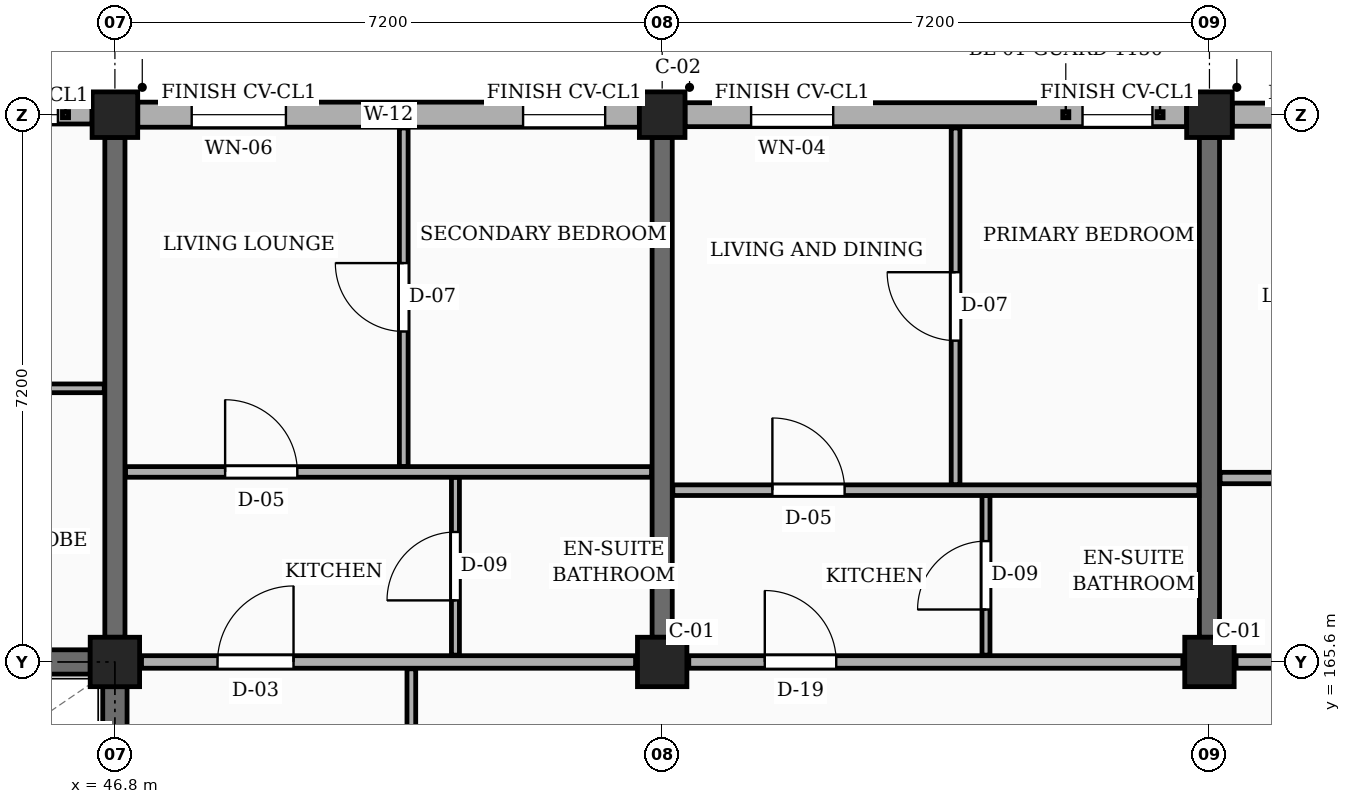
"""IFC4 building model, lengths in metres.
Left out: names, types, materials, properties, quantities, classifications, styles, units other than length and angle.
Written with IfcOpenShell. Run it as: python <this file> out.ifc"""

import sys

from ifc_helpers import new_model, si_unit, direction, frame, frame_2d, origin, origin_2d, place, context, subcontext, project, spatial, rectangle, extrude, element, fill, save


model = new_model("IFC4")
c1 = context("Model", 3, precision=1e-05, world=origin(), true_north=direction((0.0, 1.0)))
c2 = subcontext(c1, "Body", "Model", "MODEL_VIEW")
j1 = project(units=[si_unit("LENGTHUNIT", "METRE"), si_unit("PLANEANGLEUNIT", "RADIAN")], contexts=[c1])
p1 = place(None, origin())
s1 = spatial("IfcSite", under=j1, at=p1, CompositionType="ELEMENT")
p2 = place(p1, origin())
s2 = spatial("IfcBuilding", under=s1, at=p2, CompositionType="ELEMENT")
p3 = place(p2, frame((0.0, 0.0, 7.65)))
s3 = spatial("IfcBuildingStorey", under=s2, at=p3, CompositionType="ELEMENT", Elevation=7.65)
p4 = place(p3, frame((46.8, 165.6, 0.0), z_axis=(0.0, 0.0, 1.0), x_axis=(1.0, 0.0, 0.0)))
e1 = element("IfcColumn", 1, at=p4, inside=s3, PredefinedType="COLUMN", context=c2, shape_type="SweptSolid", body=[
    extrude(rectangle(XDim=0.65, YDim=0.65, at=origin_2d()), origin(), (0.0, 0.0, 1.0), 3.15),
])
p5 = place(p3, frame((46.8, 172.8, 0.0), z_axis=(0.0, 0.0, 1.0), x_axis=(1.0, 0.0, 0.0)))
e2 = element("IfcColumn", 2, at=p5, inside=s3, PredefinedType="COLUMN", context=c2, shape_type="SweptSolid", body=[
    extrude(rectangle(XDim=0.6, YDim=0.6, at=origin_2d()), origin(), (0.0, 0.0, 1.0), 3.15),
])
p6 = place(p3, frame((54.0, 165.6, 0.0), z_axis=(0.0, 0.0, 1.0), x_axis=(1.0, 0.0, 0.0)))
e3 = element("IfcColumn", 3, at=p6, inside=s3, PredefinedType="COLUMN", context=c2, shape_type="SweptSolid", body=[
    extrude(rectangle(XDim=0.65, YDim=0.65, at=origin_2d()), origin(), (0.0, 0.0, 1.0), 3.15),
])
p7 = place(p3, frame((54.0, 172.8, 0.0), z_axis=(0.0, 0.0, 1.0), x_axis=(1.0, 0.0, 0.0)))
e4 = element("IfcColumn", 4, at=p7, inside=s3, PredefinedType="COLUMN", context=c2, shape_type="SweptSolid", body=[
    extrude(rectangle(XDim=0.6, YDim=0.6, at=origin_2d()), origin(), (0.0, 0.0, 1.0), 3.15),
])
p8 = place(p3, frame((61.2, 165.6, 0.0), z_axis=(0.0, 0.0, 1.0), x_axis=(1.0, 0.0, 0.0)))
e5 = element("IfcColumn", 5, at=p8, inside=s3, PredefinedType="COLUMN", context=c2, shape_type="SweptSolid", body=[
    extrude(rectangle(XDim=0.65, YDim=0.65, at=origin_2d()), origin(), (0.0, 0.0, 1.0), 3.15),
])
p9 = place(p3, frame((61.2, 172.8, 0.0), z_axis=(0.0, 0.0, 1.0), x_axis=(1.0, 0.0, 0.0)))
e6 = element("IfcColumn", 6, at=p9, inside=s3, PredefinedType="COLUMN", context=c2, shape_type="SweptSolid", body=[
    extrude(rectangle(XDim=0.6, YDim=0.6, at=origin_2d()), origin(), (0.0, 0.0, 1.0), 3.15),
])
for number, where, z_axis, x_axis in (
    (7, (46.8, 165.925, 0.0), (0.0, 0.0, 1.0), (0.0, 1.0, 0.0)),
    (8, (54.0, 165.925, 0.0), (0.0, 0.0, 1.0), (0.0, 1.0, 0.0)),
    (9, (61.2, 165.925, 0.0), (0.0, 0.0, 1.0), (0.0, 1.0, 0.0)),
):
    element("IfcWall", number, at=place(p3, frame(where, z_axis=z_axis, x_axis=x_axis)), inside=s3, PredefinedType="SOLIDWALL", context=c2, shape_type="SweptSolid", body=[
        extrude(rectangle(XDim=6.575, YDim=0.265, at=frame_2d((3.288, 0.0))), origin(), (0.0, 0.0, 1.0), 2.185),
    ])
p10 = place(p3, frame((68.1, 172.8, 0.0), z_axis=(0.0, 0.0, 1.0), x_axis=(-1.0, 0.0, 0.0)))
e10 = element("IfcWall", 10, at=p10, inside=s3, PredefinedType="SOLIDWALL", context=c2, shape_type="SweptSolid", body=[
    extrude(rectangle(XDim=6.6, YDim=0.305, at=frame_2d((3.3, 0.0))), origin(), (0.0, 0.0, 1.0), 2.455),
])
p11 = place(p10, frame((0.45, 0.0, 0.78)))
e11 = element("IfcOpeningElement", 11, at=p11, cuts=e10, PredefinedType="OPENING", context=c2, shape_type="SweptSolid", body=[
    extrude(rectangle(XDim=1.45, YDim=1.44, at=frame_2d((0.725, 0.72))), frame((0.0, 0.163, 0.0), z_axis=(0.0, -1.0, 0.0), x_axis=(1.0, 0.0, 0.0)), (0.0, 0.0, 1.0), 0.325),
])
p12 = place(p10, frame((4.65, 0.0, 0.78)))
e12 = element("IfcOpeningElement", 12, at=p12, cuts=e10, PredefinedType="OPENING", context=c2, shape_type="SweptSolid", body=[
    extrude(rectangle(XDim=0.92, YDim=1.15, at=frame_2d((0.46, 0.575))), frame((0.0, 0.163, 0.0), z_axis=(0.0, -1.0, 0.0), x_axis=(1.0, 0.0, 0.0)), (0.0, 0.0, 1.0), 0.325),
])
p13 = place(p3, frame((60.9, 172.8, 0.0), z_axis=(0.0, 0.0, 1.0), x_axis=(-1.0, 0.0, 0.0)))
e13 = element("IfcWall", 13, at=p13, inside=s3, PredefinedType="SOLIDWALL", context=c2, shape_type="SweptSolid", body=[
    extrude(rectangle(XDim=6.6, YDim=0.315, at=frame_2d((3.3, 0.0))), origin(), (0.0, 0.0, 1.0), 2.455),
])
p14 = place(p13, frame((0.45, 0.0, 0.78)))
e14 = element("IfcOpeningElement", 14, at=p14, cuts=e13, PredefinedType="OPENING", context=c2, shape_type="SweptSolid", body=[
    extrude(rectangle(XDim=0.92, YDim=1.15, at=frame_2d((0.46, 0.575))), frame((0.0, 0.167, 0.0), z_axis=(0.0, -1.0, 0.0), x_axis=(1.0, 0.0, 0.0)), (0.0, 0.0, 1.0), 0.335),
])
p15 = place(p13, frame((4.65, 0.0, 0.78)))
e15 = element("IfcOpeningElement", 15, at=p15, cuts=e13, PredefinedType="OPENING", context=c2, shape_type="SweptSolid", body=[
    extrude(rectangle(XDim=1.08, YDim=1.15, at=frame_2d((0.54, 0.575))), frame((0.0, 0.167, 0.0), z_axis=(0.0, -1.0, 0.0), x_axis=(1.0, 0.0, 0.0)), (0.0, 0.0, 1.0), 0.335),
])
p16 = place(p3, frame((53.7, 172.8, 0.0), z_axis=(0.0, 0.0, 1.0), x_axis=(-1.0, 0.0, 0.0)))
e16 = element("IfcWall", 16, at=p16, inside=s3, PredefinedType="SOLIDWALL", context=c2, shape_type="SweptSolid", body=[
    extrude(rectangle(XDim=6.6, YDim=0.33, at=frame_2d((3.3, 0.0))), origin(), (0.0, 0.0, 1.0), 2.455),
])
p17 = place(p16, frame((0.45, 0.0, 0.78)))
e17 = element("IfcOpeningElement", 17, at=p17, cuts=e16, PredefinedType="OPENING", context=c2, shape_type="SweptSolid", body=[
    extrude(rectangle(XDim=1.08, YDim=1.15, at=frame_2d((0.54, 0.575))), frame((0.0, 0.175, 0.0), z_axis=(0.0, -1.0, 0.0), x_axis=(1.0, 0.0, 0.0)), (0.0, 0.0, 1.0), 0.35),
])
p18 = place(p16, frame((4.65, 0.0, 0.78)))
e18 = element("IfcOpeningElement", 18, at=p18, cuts=e16, PredefinedType="OPENING", context=c2, shape_type="SweptSolid", body=[
    extrude(rectangle(XDim=1.24, YDim=1.15, at=frame_2d((0.62, 0.575))), frame((0.0, 0.175, 0.0), z_axis=(0.0, -1.0, 0.0), x_axis=(1.0, 0.0, 0.0)), (0.0, 0.0, 1.0), 0.35),
])
p19 = place(p3, frame((46.5, 172.8, 0.0), z_axis=(0.0, 0.0, 1.0), x_axis=(-1.0, 0.0, 0.0)))
e19 = element("IfcWall", 19, at=p19, inside=s3, PredefinedType="SOLIDWALL", context=c2, shape_type="SweptSolid", body=[
    extrude(rectangle(XDim=6.6, YDim=0.245, at=frame_2d((3.3, 0.0))), origin(), (0.0, 0.0, 1.0), 2.455),
])
p20 = place(p19, frame((0.45, 0.0, 0.78)))
e20 = element("IfcOpeningElement", 20, at=p20, cuts=e19, PredefinedType="OPENING", context=c2, shape_type="SweptSolid", body=[
    extrude(rectangle(XDim=1.24, YDim=1.15, at=frame_2d((0.62, 0.575))), frame((0.0, 0.133, 0.0), z_axis=(0.0, -1.0, 0.0), x_axis=(1.0, 0.0, 0.0)), (0.0, 0.0, 1.0), 0.265),
])
p21 = place(p19, frame((4.65, 0.0, 0.78)))
e21 = element("IfcOpeningElement", 21, at=p21, cuts=e19, PredefinedType="OPENING", context=c2, shape_type="SweptSolid", body=[
    extrude(rectangle(XDim=1.4, YDim=1.15, at=frame_2d((0.7, 0.575))), frame((0.0, 0.133, 0.0), z_axis=(0.0, -1.0, 0.0), x_axis=(1.0, 0.0, 0.0)), (0.0, 0.0, 1.0), 0.265),
])
p22 = place(p3, frame((39.925, 165.6, 0.0), z_axis=(0.0, 0.0, 1.0), x_axis=(1.0, 0.0, 0.0)))
e22 = element("IfcWall", 22, at=p22, inside=s3, PredefinedType="SHEAR", context=c2, shape_type="SweptSolid", body=[
    extrude(rectangle(XDim=6.55, YDim=0.32, at=frame_2d((3.275, 0.0))), origin(), (0.0, 0.0, 1.0), 2.885),
])
p23 = place(p3, frame((46.8, 158.725, 0.0), z_axis=(0.0, 0.0, 1.0), x_axis=(0.0, 1.0, 0.0)))
e23 = element("IfcWall", 23, at=p23, inside=s3, PredefinedType="SHEAR", context=c2, shape_type="SweptSolid", body=[
    extrude(rectangle(XDim=6.55, YDim=0.32, at=frame_2d((3.275, 0.0))), origin(), (0.0, 0.0, 1.0), 2.885),
])
p24 = place(p3, frame((47.15, 165.6, 0.0), z_axis=(0.0, 0.0, 1.0), x_axis=(1.0, 0.0, 0.0)))
e24 = element("IfcWall", 24, at=p24, inside=s3, PredefinedType="PARTITIONING", context=c2, shape_type="SweptSolid", body=[
    extrude(rectangle(XDim=6.5, YDim=0.165, at=frame_2d((3.25, 0.0))), origin(), (0.0, 0.0, 1.0), 2.185),
])
p25 = place(p24, frame((1.0, 0.0, 0.0)))
e25 = element("IfcOpeningElement", 25, at=p25, cuts=e24, PredefinedType="OPENING", context=c2, shape_type="SweptSolid", body=[
    extrude(rectangle(XDim=1.0, YDim=2.15, at=frame_2d((0.5, 1.075))), frame((0.0, 0.093, 0.0), z_axis=(0.0, -1.0, 0.0), x_axis=(1.0, 0.0, 0.0)), (0.0, 0.0, 1.0), 0.185),
])
p26 = place(p3, frame((54.35, 165.6, 0.0), z_axis=(0.0, 0.0, 1.0), x_axis=(1.0, 0.0, 0.0)))
e26 = element("IfcWall", 26, at=p26, inside=s3, PredefinedType="PARTITIONING", context=c2, shape_type="SweptSolid", body=[
    extrude(rectangle(XDim=6.5, YDim=0.165, at=frame_2d((3.25, 0.0))), origin(), (0.0, 0.0, 1.0), 2.185),
])
p27 = place(p26, frame((1.0, 0.0, 0.0)))
e27 = element("IfcOpeningElement", 27, at=p27, cuts=e26, PredefinedType="OPENING", context=c2, shape_type="SweptSolid", body=[
    extrude(rectangle(XDim=0.94, YDim=2.12, at=frame_2d((0.47, 1.06))), frame((0.0, 0.093, 0.0), z_axis=(0.0, -1.0, 0.0), x_axis=(1.0, 0.0, 0.0)), (0.0, 0.0, 1.0), 0.185),
])
p28 = place(p3, frame((61.55, 165.6, 0.0), z_axis=(0.0, 0.0, 1.0), x_axis=(1.0, 0.0, 0.0)))
e28 = element("IfcWall", 28, at=p28, inside=s3, PredefinedType="PARTITIONING", context=c2, shape_type="SweptSolid", body=[
    extrude(rectangle(XDim=6.5, YDim=0.165, at=frame_2d((3.25, 0.0))), origin(), (0.0, 0.0, 1.0), 2.185),
])
p29 = place(p28, frame((1.0, 0.0, 0.0)))
e29 = element("IfcOpeningElement", 29, at=p29, cuts=e28, PredefinedType="OPENING", context=c2, shape_type="SweptSolid", body=[
    extrude(rectangle(XDim=1.14, YDim=2.18, at=frame_2d((0.57, 1.09))), frame((0.0, 0.093, 0.0), z_axis=(0.0, -1.0, 0.0), x_axis=(1.0, 0.0, 0.0)), (0.0, 0.0, 1.0), 0.185),
])
p30 = place(p3, frame((39.74, 169.2, 0.0), z_axis=(0.0, 0.0, 1.0), x_axis=(1.0, 0.0, 0.0)))
e30 = element("IfcWall", 30, at=p30, inside=s3, PredefinedType="PARTITIONING", context=c2, shape_type="SweptSolid", body=[
    extrude(rectangle(XDim=6.92, YDim=0.115, at=frame_2d((3.46, 0.0))), origin(), (0.0, 0.0, 1.0), 2.32),
])
p31 = place(p30, frame((1.05, 0.0, 0.0)))
e31 = element("IfcOpeningElement", 31, at=p31, cuts=e30, PredefinedType="OPENING", context=c2, shape_type="SweptSolid", body=[
    extrude(rectangle(XDim=0.87, YDim=2.05, at=frame_2d((0.435, 1.025))), frame((0.0, 0.067, 0.0), z_axis=(0.0, -1.0, 0.0), x_axis=(1.0, 0.0, 0.0)), (0.0, 0.0, 1.0), 0.135),
])
p32 = place(p30, frame((4.45, 0.0, 0.0)))
e32 = element("IfcOpeningElement", 32, at=p32, cuts=e30, PredefinedType="OPENING", context=c2, shape_type="SweptSolid", body=[
    extrude(rectangle(XDim=0.88, YDim=2.08, at=frame_2d((0.44, 1.04))), frame((0.0, 0.067, 0.0), z_axis=(0.0, -1.0, 0.0), x_axis=(1.0, 0.0, 0.0)), (0.0, 0.0, 1.0), 0.135),
])
p33 = place(p3, frame((50.7, 158.49, 0.0), z_axis=(0.0, 0.0, 1.0), x_axis=(0.0, 1.0, 0.0)))
e33 = element("IfcWall", 33, at=p33, inside=s3, PredefinedType="PARTITIONING", context=c2, shape_type="SweptSolid", body=[
    extrude(rectangle(XDim=7.02, YDim=0.115, at=frame_2d((3.51, 0.0))), origin(), (0.0, 0.0, 1.0), 2.32),
])
p34 = place(p33, frame((2.85, 0.0, 0.0)))
e34 = element("IfcOpeningElement", 34, at=p34, cuts=e33, PredefinedType="OPENING", context=c2, shape_type="SweptSolid", body=[
    extrude(rectangle(XDim=1.02, YDim=2.15, at=frame_2d((0.51, 1.075))), frame((0.0, 0.067, 0.0), z_axis=(0.0, -1.0, 0.0), x_axis=(1.0, 0.0, 0.0)), (0.0, 0.0, 1.0), 0.135),
])
p35 = place(p3, frame((50.6, 168.17, 0.0), z_axis=(0.0, 0.0, 1.0), x_axis=(0.0, 1.0, 0.0)))
e35 = element("IfcWall", 35, at=p35, inside=s3, PredefinedType="PARTITIONING", context=c2, shape_type="SweptSolid", body=[
    extrude(rectangle(XDim=4.455, YDim=0.115, at=frame_2d((2.228, 0.0))), origin(), (0.0, 0.0, 1.0), 2.32),
])
p36 = place(p35, frame((1.778, 0.0, 0.0)))
e36 = element("IfcOpeningElement", 36, at=p36, cuts=e35, PredefinedType="OPENING", context=c2, shape_type="SweptSolid", body=[
    extrude(rectangle(XDim=0.9, YDim=2.1, at=frame_2d((0.45, 1.05))), frame((0.0, 0.067, 0.0), z_axis=(0.0, -1.0, 0.0), x_axis=(1.0, 0.0, 0.0)), (0.0, 0.0, 1.0), 0.135),
])
p37 = place(p3, frame((51.28, 165.69, 0.0), z_axis=(0.0, 0.0, 1.0), x_axis=(0.0, 1.0, 0.0)))
e37 = element("IfcWall", 37, at=p37, inside=s3, PredefinedType="PARTITIONING", context=c2, shape_type="SweptSolid", body=[
    extrude(rectangle(XDim=2.34, YDim=0.105, at=frame_2d((1.17, 0.0))), origin(), (0.0, 0.0, 1.0), 2.32),
])
p38 = place(p37, frame((0.72, 0.0, 0.0)))
e38 = element("IfcOpeningElement", 38, at=p38, cuts=e37, PredefinedType="OPENING", context=c2, shape_type="SweptSolid", body=[
    extrude(rectangle(XDim=0.9, YDim=2.05, at=frame_2d((0.45, 1.025))), frame((0.0, 0.062, 0.0), z_axis=(0.0, -1.0, 0.0), x_axis=(1.0, 0.0, 0.0)), (0.0, 0.0, 1.0), 0.125),
])
p39 = place(p3, frame((46.94, 168.1, 0.0), z_axis=(0.0, 0.0, 1.0), x_axis=(1.0, 0.0, 0.0)))
e39 = element("IfcWall", 39, at=p39, inside=s3, PredefinedType="PARTITIONING", context=c2, shape_type="SweptSolid", body=[
    extrude(rectangle(XDim=6.92, YDim=0.14, at=frame_2d((3.46, 0.0))), origin(), (0.0, 0.0, 1.0), 2.32),
])
p40 = place(p39, frame((1.31, 0.0, 0.0)))
e40 = element("IfcOpeningElement", 40, at=p40, cuts=e39, PredefinedType="OPENING", context=c2, shape_type="SweptSolid", body=[
    extrude(rectangle(XDim=0.95, YDim=2.1, at=frame_2d((0.475, 1.05))), frame((0.0, 0.08, 0.0), z_axis=(0.0, -1.0, 0.0), x_axis=(1.0, 0.0, 0.0)), (0.0, 0.0, 1.0), 0.16),
])
p41 = place(p3, frame((57.86, 167.93, 0.0), z_axis=(0.0, 0.0, 1.0), x_axis=(0.0, 1.0, 0.0)))
e41 = element("IfcWall", 41, at=p41, inside=s3, PredefinedType="PARTITIONING", context=c2, shape_type="SweptSolid", body=[
    extrude(rectangle(XDim=4.695, YDim=0.115, at=frame_2d((2.348, 0.0))), origin(), (0.0, 0.0, 1.0), 2.32),
])
p42 = place(p41, frame((1.897, 0.0, 0.0)))
e42 = element("IfcOpeningElement", 42, at=p42, cuts=e41, PredefinedType="OPENING", context=c2, shape_type="SweptSolid", body=[
    extrude(rectangle(XDim=0.9, YDim=2.1, at=frame_2d((0.45, 1.05))), frame((0.0, 0.067, 0.0), z_axis=(0.0, -1.0, 0.0), x_axis=(1.0, 0.0, 0.0)), (0.0, 0.0, 1.0), 0.135),
])
p43 = place(p3, frame((58.26, 165.69, 0.0), z_axis=(0.0, 0.0, 1.0), x_axis=(0.0, 1.0, 0.0)))
e43 = element("IfcWall", 43, at=p43, inside=s3, PredefinedType="PARTITIONING", context=c2, shape_type="SweptSolid", body=[
    extrude(rectangle(XDim=2.1, YDim=0.105, at=frame_2d((1.05, 0.0))), origin(), (0.0, 0.0, 1.0), 2.32),
])
p44 = place(p43, frame((0.6, 0.0, 0.0)))
e44 = element("IfcOpeningElement", 44, at=p44, cuts=e43, PredefinedType="OPENING", context=c2, shape_type="SweptSolid", body=[
    extrude(rectangle(XDim=0.9, YDim=2.05, at=frame_2d((0.45, 1.025))), frame((0.0, 0.062, 0.0), z_axis=(0.0, -1.0, 0.0), x_axis=(1.0, 0.0, 0.0)), (0.0, 0.0, 1.0), 0.125),
])
p45 = place(p3, frame((54.14, 167.86, 0.0), z_axis=(0.0, 0.0, 1.0), x_axis=(1.0, 0.0, 0.0)))
e45 = element("IfcWall", 45, at=p45, inside=s3, PredefinedType="PARTITIONING", context=c2, shape_type="SweptSolid", body=[
    extrude(rectangle(XDim=6.92, YDim=0.14, at=frame_2d((3.46, 0.0))), origin(), (0.0, 0.0, 1.0), 2.32),
])
p46 = place(p45, frame((1.31, 0.0, 0.0)))
e46 = element("IfcOpeningElement", 46, at=p46, cuts=e45, PredefinedType="OPENING", context=c2, shape_type="SweptSolid", body=[
    extrude(rectangle(XDim=0.95, YDim=2.1, at=frame_2d((0.475, 1.05))), frame((0.0, 0.08, 0.0), z_axis=(0.0, -1.0, 0.0), x_axis=(1.0, 0.0, 0.0)), (0.0, 0.0, 1.0), 0.16),
])
p47 = place(p3, frame((61.34, 168.02, 0.0), z_axis=(0.0, 0.0, 1.0), x_axis=(1.0, 0.0, 0.0)))
e47 = element("IfcWall", 47, at=p47, inside=s3, PredefinedType="PARTITIONING", context=c2, shape_type="SweptSolid", body=[
    extrude(rectangle(XDim=6.92, YDim=0.15, at=frame_2d((3.46, 0.0))), origin(), (0.0, 0.0, 1.0), 2.32),
])
p48 = place(p47, frame((1.31, 0.0, 0.0)))
e48 = element("IfcOpeningElement", 48, at=p48, cuts=e47, PredefinedType="OPENING", context=c2, shape_type="SweptSolid", body=[
    extrude(rectangle(XDim=0.92, YDim=2.1, at=frame_2d((0.46, 1.05))), frame((0.0, 0.085, 0.0), z_axis=(0.0, -1.0, 0.0), x_axis=(1.0, 0.0, 0.0)), (0.0, 0.0, 1.0), 0.17),
])
p49 = place(p14, origin())
e49 = element("IfcWindow", 49, at=p49, inside=s3, PartitioningType="SINGLE_PANEL", PredefinedType="WINDOW", context=c2, shape_type="SweptSolid", body=[
    extrude(rectangle(XDim=0.92, YDim=1.15, at=frame_2d((0.46, 0.575))), frame((0.0, 0.03, 0.0), z_axis=(0.0, -1.0, 0.0), x_axis=(1.0, 0.0, 0.0)), (0.0, 0.0, 1.0), 0.06),
])
fill(e14, e49)
p50 = place(p15, origin())
e50 = element("IfcWindow", 50, at=p50, inside=s3, PartitioningType="SINGLE_PANEL", PredefinedType="WINDOW", context=c2, shape_type="SweptSolid", body=[
    extrude(rectangle(XDim=1.08, YDim=1.15, at=frame_2d((0.54, 0.575))), frame((0.0, 0.03, 0.0), z_axis=(0.0, -1.0, 0.0), x_axis=(1.0, 0.0, 0.0)), (0.0, 0.0, 1.0), 0.06),
])
fill(e15, e50)
p51 = place(p17, origin())
e51 = element("IfcWindow", 51, at=p51, inside=s3, PartitioningType="SINGLE_PANEL", PredefinedType="WINDOW", context=c2, shape_type="SweptSolid", body=[
    extrude(rectangle(XDim=1.08, YDim=1.15, at=frame_2d((0.54, 0.575))), frame((0.0, 0.03, 0.0), z_axis=(0.0, -1.0, 0.0), x_axis=(1.0, 0.0, 0.0)), (0.0, 0.0, 1.0), 0.06),
])
fill(e17, e51)
p52 = place(p18, origin())
e52 = element("IfcWindow", 52, at=p52, inside=s3, PartitioningType="SINGLE_PANEL", PredefinedType="WINDOW", context=c2, shape_type="SweptSolid", body=[
    extrude(rectangle(XDim=1.24, YDim=1.15, at=frame_2d((0.62, 0.575))), frame((0.0, 0.03, 0.0), z_axis=(0.0, -1.0, 0.0), x_axis=(1.0, 0.0, 0.0)), (0.0, 0.0, 1.0), 0.06),
])
fill(e18, e52)
p53 = place(p20, origin())
e53 = element("IfcWindow", 53, at=p53, inside=s3, PartitioningType="SINGLE_PANEL", PredefinedType="WINDOW", context=c2, shape_type="SweptSolid", body=[
    extrude(rectangle(XDim=1.24, YDim=1.15, at=frame_2d((0.62, 0.575))), frame((0.0, 0.03, 0.0), z_axis=(0.0, -1.0, 0.0), x_axis=(1.0, 0.0, 0.0)), (0.0, 0.0, 1.0), 0.06),
])
fill(e20, e53)
p54 = place(p25, origin())
e54 = element("IfcDoor", 54, at=p54, inside=s3, OperationType="SINGLE_SWING_RIGHT", PredefinedType="DOOR", context=c2, shape_type="SweptSolid", body=[
    extrude(rectangle(XDim=1.0, YDim=2.15, at=frame_2d((0.5, 1.075))), frame((0.0, 0.025, 0.0), z_axis=(0.0, -1.0, 0.0), x_axis=(1.0, 0.0, 0.0)), (0.0, 0.0, 1.0), 0.05),
])
fill(e25, e54)
p55 = place(p27, origin())
e55 = element("IfcDoor", 55, at=p55, inside=s3, OperationType="SINGLE_SWING_LEFT", PredefinedType="DOOR", context=c2, shape_type="SweptSolid", body=[
    extrude(rectangle(XDim=0.94, YDim=2.12, at=frame_2d((0.47, 1.06))), frame((0.0, 0.025, 0.0), z_axis=(0.0, -1.0, 0.0), x_axis=(1.0, 0.0, 0.0)), (0.0, 0.0, 1.0), 0.05),
])
fill(e27, e55)
p56 = place(p36, origin())
e56 = element("IfcDoor", 56, at=p56, inside=s3, OperationType="SINGLE_SWING_RIGHT", PredefinedType="DOOR", context=c2, shape_type="SweptSolid", body=[
    extrude(rectangle(XDim=0.9, YDim=2.1, at=frame_2d((0.45, 1.05))), frame((0.0, 0.025, 0.0), z_axis=(0.0, -1.0, 0.0), x_axis=(1.0, 0.0, 0.0)), (0.0, 0.0, 1.0), 0.05),
])
fill(e36, e56)
p57 = place(p38, origin())
e57 = element("IfcDoor", 57, at=p57, inside=s3, OperationType="SINGLE_SWING_LEFT", PredefinedType="DOOR", context=c2, shape_type="SweptSolid", body=[
    extrude(rectangle(XDim=0.9, YDim=2.05, at=frame_2d((0.45, 1.025))), frame((0.0, 0.025, 0.0), z_axis=(0.0, -1.0, 0.0), x_axis=(1.0, 0.0, 0.0)), (0.0, 0.0, 1.0), 0.05),
])
fill(e38, e57)
p58 = place(p40, origin())
e58 = element("IfcDoor", 58, at=p58, inside=s3, OperationType="SINGLE_SWING_LEFT", PredefinedType="DOOR", context=c2, shape_type="SweptSolid", body=[
    extrude(rectangle(XDim=0.95, YDim=2.1, at=frame_2d((0.475, 1.05))), frame((0.0, 0.025, 0.0), z_axis=(0.0, -1.0, 0.0), x_axis=(1.0, 0.0, 0.0)), (0.0, 0.0, 1.0), 0.05),
])
fill(e40, e58)
p59 = place(p42, origin())
e59 = element("IfcDoor", 59, at=p59, inside=s3, OperationType="SINGLE_SWING_RIGHT", PredefinedType="DOOR", context=c2, shape_type="SweptSolid", body=[
    extrude(rectangle(XDim=0.9, YDim=2.1, at=frame_2d((0.45, 1.05))), frame((0.0, 0.025, 0.0), z_axis=(0.0, -1.0, 0.0), x_axis=(1.0, 0.0, 0.0)), (0.0, 0.0, 1.0), 0.05),
])
fill(e42, e59)
p60 = place(p44, origin())
e60 = element("IfcDoor", 60, at=p60, inside=s3, OperationType="SINGLE_SWING_LEFT", PredefinedType="DOOR", context=c2, shape_type="SweptSolid", body=[
    extrude(rectangle(XDim=0.9, YDim=2.05, at=frame_2d((0.45, 1.025))), frame((0.0, 0.025, 0.0), z_axis=(0.0, -1.0, 0.0), x_axis=(1.0, 0.0, 0.0)), (0.0, 0.0, 1.0), 0.05),
])
fill(e44, e60)
p61 = place(p46, origin())
e61 = element("IfcDoor", 61, at=p61, inside=s3, OperationType="SINGLE_SWING_LEFT", PredefinedType="DOOR", context=c2, shape_type="SweptSolid", body=[
    extrude(rectangle(XDim=0.95, YDim=2.1, at=frame_2d((0.475, 1.05))), frame((0.0, 0.025, 0.0), z_axis=(0.0, -1.0, 0.0), x_axis=(1.0, 0.0, 0.0)), (0.0, 0.0, 1.0), 0.05),
])
fill(e46, e61)
save(model, sys.argv[1])
